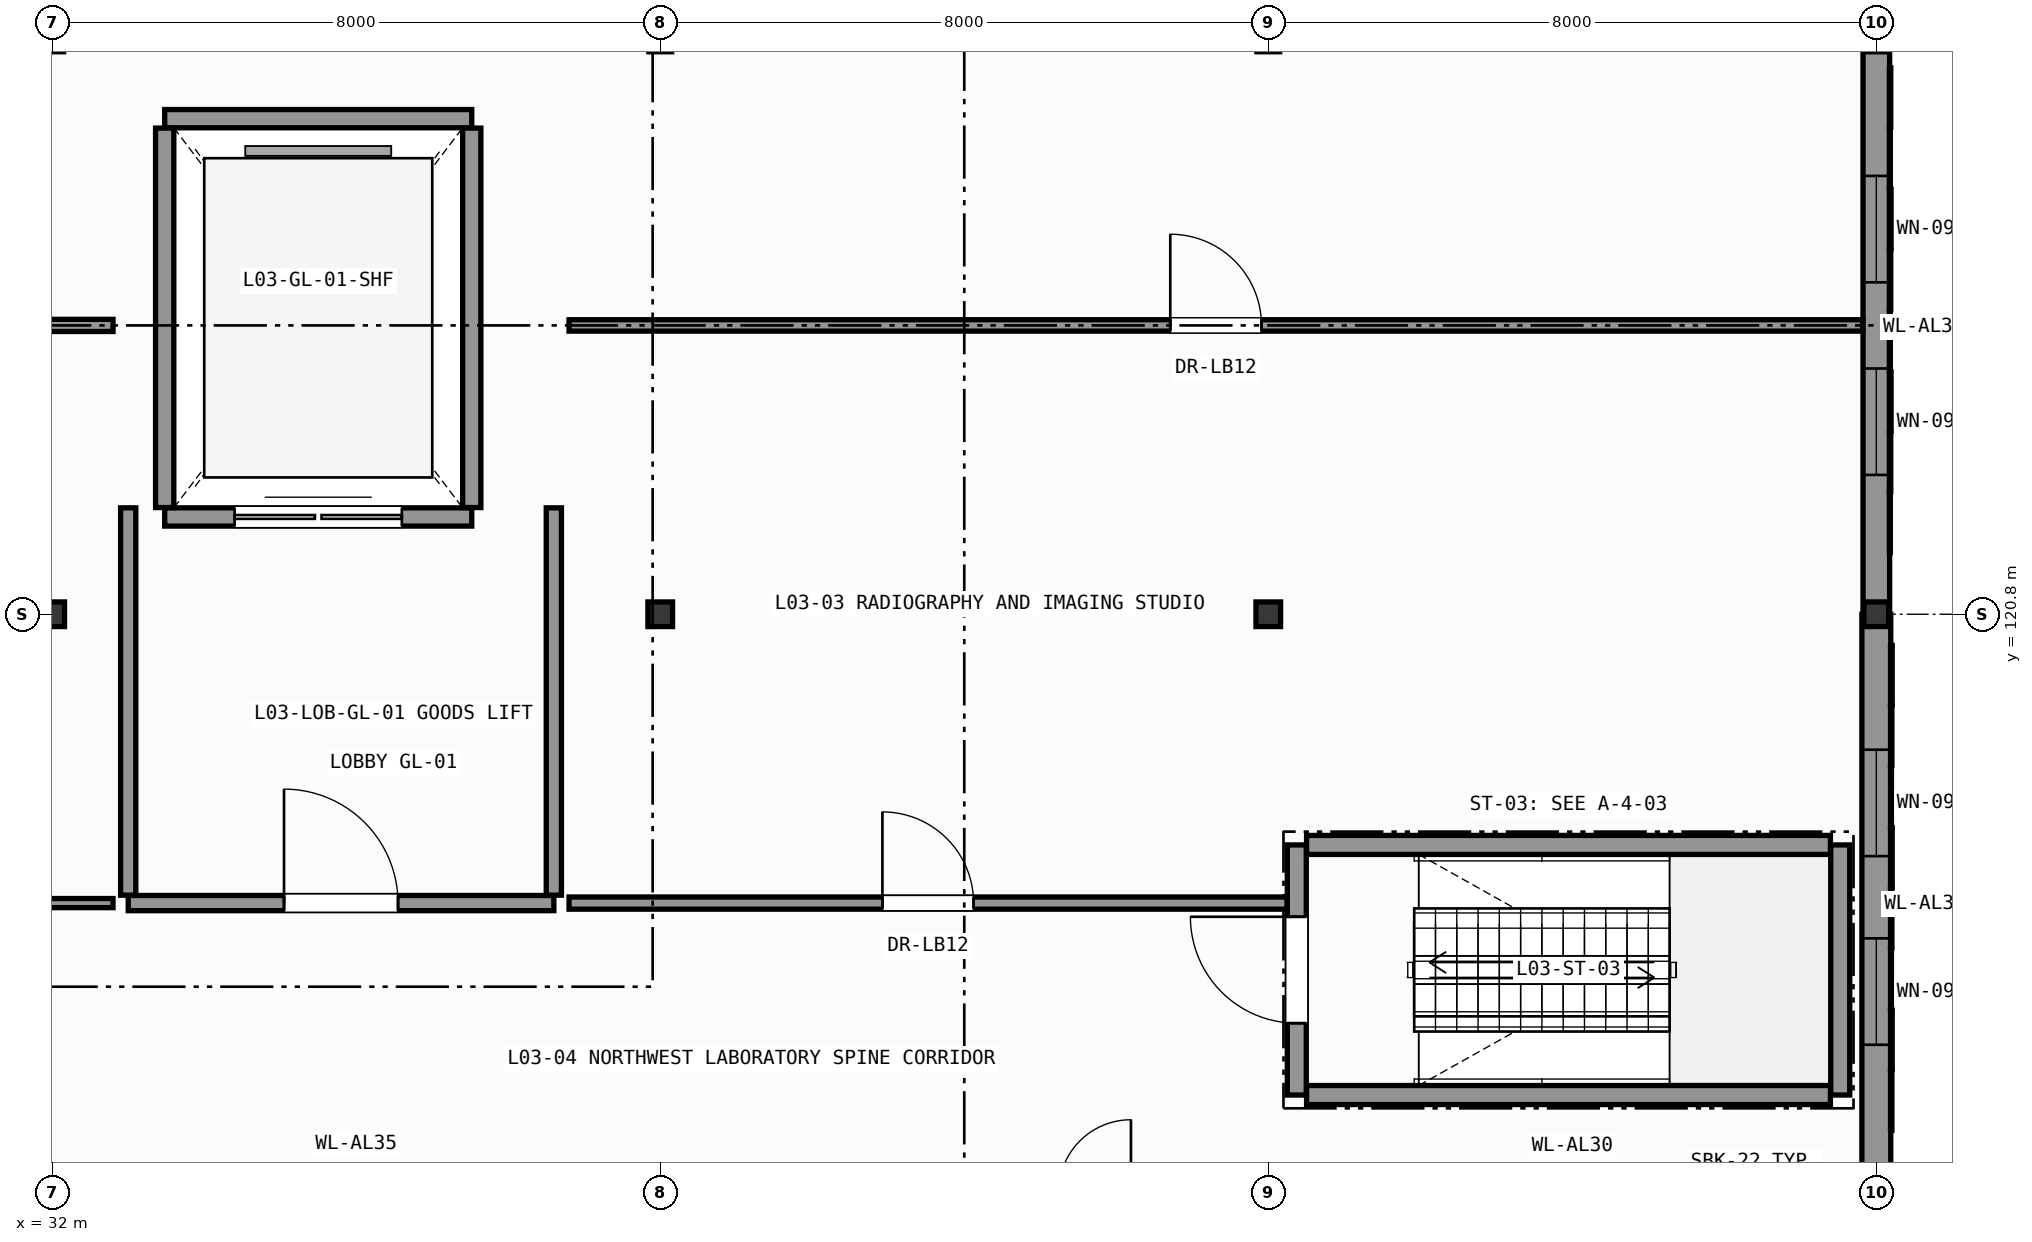
"""IFC4 building model, lengths in metres.
Left out: names, types, materials, properties, quantities, classifications, styles, units other than length and angle.
Written with IfcOpenShell. Run it as: python <this file> out.ifc"""

import sys

from ifc_helpers import new_model, si_unit, direction, frame, frame_2d, origin, origin_2d, place, context, subcontext, project, spatial, rectangle, hollow_circle, extrude, element, fill, save


model = new_model("IFC4")
c1 = context("Model", 3, precision=1e-05, world=origin(), true_north=direction((0.0, 1.0)))
c2 = subcontext(c1, "Body", "Model", "MODEL_VIEW")
j1 = project(units=[si_unit("LENGTHUNIT", "METRE"), si_unit("PLANEANGLEUNIT", "RADIAN")], contexts=[c1])
p1 = place(None, origin())
s1 = spatial("IfcSite", under=j1, at=p1, CompositionType="ELEMENT")
p2 = place(p1, origin())
s2 = spatial("IfcBuilding", under=s1, at=p2, CompositionType="ELEMENT")
p3 = place(p2, frame((0.0, 0.0, 13.2)))
s3 = spatial("IfcBuildingStorey", under=s2, at=p3, CompositionType="ELEMENT", Elevation=13.2)
for number, where, z_axis, x_axis in (
    (1, (32.0, 120.8, 0.0), (0.0, 0.0, 1.0), (1.0, 0.0, 0.0)),
    (2, (40.0, 120.8, 0.0), (0.0, 0.0, 1.0), (1.0, 0.0, 0.0)),
    (3, (48.0, 120.8, 0.0), (0.0, 0.0, 1.0), (1.0, 0.0, 0.0)),
    (4, (56.0, 120.8, 0.0), (0.0, 0.0, 1.0), (1.0, 0.0, 0.0)),
):
    element("IfcColumn", number, at=place(p3, frame(where, z_axis=z_axis, x_axis=x_axis)), inside=s3, PredefinedType="COLUMN", context=c2, shape_type="SweptSolid", body=[
        extrude(hollow_circle(Radius=0.162, WallThickness=0.016, at=origin_2d()), origin(), (0.0, 0.0, 1.0), 4.8),
    ])
p4 = place(p3, frame((56.0, 120.8, 0.0), z_axis=(0.0, 0.0, 1.0), x_axis=(0.0, -1.0, 0.0)))
e5 = element("IfcWall", 5, at=p4, inside=s3, PredefinedType="SOLIDWALL", context=c2, shape_type="SweptSolid", body=[
    extrude(rectangle(XDim=7.446, YDim=0.38, at=frame_2d((3.723, 0.0))), origin(), (0.0, 0.0, 1.0), 4.045),
])
p5 = place(p4, frame((1.782, 0.0, 0.95)))
e6 = element("IfcOpeningElement", 6, at=p5, cuts=e5, PredefinedType="OPENING", context=c2, shape_type="SweptSolid", body=[
    extrude(rectangle(XDim=1.4, YDim=2.0, at=frame_2d((0.7, 1.0))), frame((0.0, 0.2, 0.0), z_axis=(0.0, -1.0, 0.0), x_axis=(1.0, 0.0, 0.0)), (0.0, 0.0, 1.0), 0.4),
])
p6 = place(p4, frame((4.264, 0.0, 0.95)))
e7 = element("IfcOpeningElement", 7, at=p6, cuts=e5, PredefinedType="OPENING", context=c2, shape_type="SweptSolid", body=[
    extrude(rectangle(XDim=1.4, YDim=2.0, at=frame_2d((0.7, 1.0))), frame((0.0, 0.2, 0.0), z_axis=(0.0, -1.0, 0.0), x_axis=(1.0, 0.0, 0.0)), (0.0, 0.0, 1.0), 0.4),
])
p7 = place(p3, frame((56.0, 128.4, 0.0), z_axis=(0.0, 0.0, 1.0), x_axis=(0.0, -1.0, 0.0)))
e8 = element("IfcWall", 8, at=p7, inside=s3, PredefinedType="SOLIDWALL", context=c2, shape_type="SweptSolid", body=[
    extrude(rectangle(XDim=7.6, YDim=0.35, at=frame_2d((3.8, 0.0))), origin(), (0.0, 0.0, 1.0), 4.045),
])
p8 = place(p7, frame((1.833, 0.0, 0.95)))
e9 = element("IfcOpeningElement", 9, at=p8, cuts=e8, PredefinedType="OPENING", context=c2, shape_type="SweptSolid", body=[
    extrude(rectangle(XDim=1.4, YDim=2.0, at=frame_2d((0.7, 1.0))), frame((0.0, 0.185, 0.0), z_axis=(0.0, -1.0, 0.0), x_axis=(1.0, 0.0, 0.0)), (0.0, 0.0, 1.0), 0.37),
])
p9 = place(p7, frame((4.367, 0.0, 0.95)))
e10 = element("IfcOpeningElement", 10, at=p9, cuts=e8, PredefinedType="OPENING", context=c2, shape_type="SweptSolid", body=[
    extrude(rectangle(XDim=1.4, YDim=2.0, at=frame_2d((0.7, 1.0))), frame((0.0, 0.185, 0.0), z_axis=(0.0, -1.0, 0.0), x_axis=(1.0, 0.0, 0.0)), (0.0, 0.0, 1.0), 0.37),
])
p10 = place(p3, frame((48.375, 114.475, 0.0), z_axis=(0.0, 0.0, 1.0), x_axis=(0.0, 1.0, 0.0)))
e11 = element("IfcWall", 11, at=p10, inside=s3, PredefinedType="SHEAR", context=c2, shape_type="SweptSolid", body=[
    extrude(rectangle(XDim=3.29, YDim=0.25, at=frame_2d((1.645, 0.0))), origin(), (0.0, 0.0, 1.0), 4.56),
])
p11 = place(p10, frame((0.945, 0.0, 0.0)))
e12 = element("IfcOpeningElement", 12, at=p11, cuts=e11, PredefinedType="OPENING", context=c2, shape_type="SweptSolid", body=[
    extrude(rectangle(XDim=1.4, YDim=2.2, at=frame_2d((0.7, 1.1))), frame((0.0, 0.135, 0.0), z_axis=(0.0, -1.0, 0.0), x_axis=(1.0, 0.0, 0.0)), (0.0, 0.0, 1.0), 0.27),
])
p12 = place(p3, frame((55.525, 114.475, 0.0), z_axis=(0.0, 0.0, 1.0), x_axis=(0.0, 1.0, 0.0)))
e13 = element("IfcWall", 13, at=p12, inside=s3, PredefinedType="SHEAR", context=c2, shape_type="SweptSolid", body=[
    extrude(rectangle(XDim=3.29, YDim=0.25, at=frame_2d((1.645, 0.0))), origin(), (0.0, 0.0, 1.0), 4.56),
])
for number, where, z_axis, x_axis in (
    (14, (48.504, 114.475, 0.0), (0.0, 0.0, 1.0), (1.0, 0.0, 0.0)),
    (15, (48.504, 117.765, 0.0), (0.0, 0.0, 1.0), (1.0, 0.0, 0.0)),
):
    element("IfcWall", number, at=place(p3, frame(where, z_axis=z_axis, x_axis=x_axis)), inside=s3, PredefinedType="SHEAR", context=c2, shape_type="SweptSolid", body=[
        extrude(rectangle(XDim=6.892, YDim=0.25, at=frame_2d((3.446, 0.0))), origin(), (0.0, 0.0, 1.0), 4.56),
    ])
p13 = place(p3, frame((33.48, 122.08, 0.0), z_axis=(0.0, 0.0, 1.0), x_axis=(1.0, 0.0, 0.0)))
e16 = element("IfcWall", 16, at=p13, inside=s3, PredefinedType="SHEAR", context=c2, shape_type="SweptSolid", body=[
    extrude(rectangle(XDim=4.04, YDim=0.24, at=frame_2d((2.02, 0.0))), origin(), (0.0, 0.0, 1.0), 4.56),
])
p14 = place(p13, frame((0.92, 0.0, 0.0)))
e17 = element("IfcOpeningElement", 17, at=p14, cuts=e16, PredefinedType="OPENING", context=c2, shape_type="SweptSolid", body=[
    extrude(rectangle(XDim=2.2, YDim=2.6, at=frame_2d((1.1, 1.3))), frame((0.0, 0.13, 0.0), z_axis=(0.0, -1.0, 0.0), x_axis=(1.0, 0.0, 0.0)), (0.0, 0.0, 1.0), 0.26),
])
p15 = place(p3, frame((33.48, 127.32, 0.0), z_axis=(0.0, 0.0, 1.0), x_axis=(1.0, 0.0, 0.0)))
e18 = element("IfcWall", 18, at=p15, inside=s3, PredefinedType="SHEAR", context=c2, shape_type="SweptSolid", body=[
    extrude(rectangle(XDim=4.04, YDim=0.24, at=frame_2d((2.02, 0.0))), origin(), (0.0, 0.0, 1.0), 4.56),
])
for number, where, z_axis, x_axis in (
    (19, (33.48, 122.204, 0.0), (0.0, 0.0, 1.0), (0.0, 1.0, 0.0)),
    (20, (37.52, 122.204, 0.0), (0.0, 0.0, 1.0), (0.0, 1.0, 0.0)),
):
    element("IfcWall", number, at=place(p3, frame(where, z_axis=z_axis, x_axis=x_axis)), inside=s3, PredefinedType="SHEAR", context=c2, shape_type="SweptSolid", body=[
        extrude(rectangle(XDim=4.992, YDim=0.24, at=frame_2d((2.496, 0.0))), origin(), (0.0, 0.0, 1.0), 4.56),
    ])
p16 = place(p3, frame((33.0, 117.0, 0.0), z_axis=(0.0, 0.0, 1.0), x_axis=(1.0, 0.0, 0.0)))
e21 = element("IfcWall", 21, at=p16, inside=s3, PredefinedType="PARTITIONING", context=c2, shape_type="SweptSolid", body=[
    extrude(rectangle(XDim=5.6, YDim=0.2, at=frame_2d((2.8, 0.0))), origin(), (0.0, 0.0, 1.0), 4.56),
])
p17 = place(p16, frame((2.05, 0.0, 0.0)))
e22 = element("IfcOpeningElement", 22, at=p17, cuts=e21, PredefinedType="OPENING", context=c2, shape_type="SweptSolid", body=[
    extrude(rectangle(XDim=1.5, YDim=2.2, at=frame_2d((0.75, 1.1))), frame((0.0, 0.11, 0.0), z_axis=(0.0, -1.0, 0.0), x_axis=(1.0, 0.0, 0.0)), (0.0, 0.0, 1.0), 0.22),
])
for number, where, z_axis, x_axis in (
    (23, (33.0, 117.104, 0.0), (0.0, 0.0, 1.0), (0.0, 1.0, 0.0)),
    (24, (38.6, 117.104, 0.0), (0.0, 0.0, 1.0), (0.0, 1.0, 0.0)),
):
    element("IfcWall", number, at=place(p3, frame(where, z_axis=z_axis, x_axis=x_axis)), inside=s3, PredefinedType="PARTITIONING", context=c2, shape_type="SweptSolid", body=[
        extrude(rectangle(XDim=5.096, YDim=0.2, at=frame_2d((2.548, 0.0))), origin(), (0.0, 0.0, 1.0), 4.56),
    ])
p18 = place(p3, frame((24.164, 124.6, 0.0), z_axis=(0.0, 0.0, 1.0), x_axis=(1.0, 0.0, 0.0)))
e25 = element("IfcWall", 25, at=p18, inside=s3, PredefinedType="PARTITIONING", context=c2, shape_type="SweptSolid", body=[
    extrude(rectangle(XDim=8.636, YDim=0.16, at=frame_2d((4.318, 0.0))), origin(), (0.0, 0.0, 1.0), 4.56),
])
p19 = place(p18, frame((3.718, 0.0, 0.0)))
e26 = element("IfcOpeningElement", 26, at=p19, cuts=e25, PredefinedType="OPENING", context=c2, shape_type="SweptSolid", body=[
    extrude(rectangle(XDim=1.2, YDim=2.2, at=frame_2d((0.6, 1.1))), frame((0.0, 0.09, 0.0), z_axis=(0.0, -1.0, 0.0), x_axis=(1.0, 0.0, 0.0)), (0.0, 0.0, 1.0), 0.18),
])
p20 = place(p3, frame((38.8, 124.6, 0.0), z_axis=(0.0, 0.0, 1.0), x_axis=(1.0, 0.0, 0.0)))
e27 = element("IfcWall", 27, at=p20, inside=s3, PredefinedType="PARTITIONING", context=c2, shape_type="SweptSolid", body=[
    extrude(rectangle(XDim=17.021, YDim=0.15, at=frame_2d((8.51, 0.0))), origin(), (0.0, 0.0, 1.0), 4.56),
])
p21 = place(p20, frame((7.91, 0.0, 0.0)))
e28 = element("IfcOpeningElement", 28, at=p21, cuts=e27, PredefinedType="OPENING", context=c2, shape_type="SweptSolid", body=[
    extrude(rectangle(XDim=1.2, YDim=2.2, at=frame_2d((0.6, 1.1))), frame((0.0, 0.085, 0.0), z_axis=(0.0, -1.0, 0.0), x_axis=(1.0, 0.0, 0.0)), (0.0, 0.0, 1.0), 0.17),
])
p22 = place(p3, frame((24.154, 117.0, 0.0), z_axis=(0.0, 0.0, 1.0), x_axis=(1.0, 0.0, 0.0)))
e29 = element("IfcWall", 29, at=p22, inside=s3, PredefinedType="PARTITIONING", context=c2, shape_type="SweptSolid", body=[
    extrude(rectangle(XDim=8.646, YDim=0.12, at=frame_2d((4.323, 0.0))), origin(), (0.0, 0.0, 1.0), 4.56),
])
p23 = place(p22, frame((3.723, 0.0, 0.0)))
e30 = element("IfcOpeningElement", 30, at=p23, cuts=e29, PredefinedType="OPENING", context=c2, shape_type="SweptSolid", body=[
    extrude(rectangle(XDim=1.2, YDim=2.2, at=frame_2d((0.6, 1.1))), frame((0.0, 0.07, 0.0), z_axis=(0.0, -1.0, 0.0), x_axis=(1.0, 0.0, 0.0)), (0.0, 0.0, 1.0), 0.14),
])
p24 = place(p3, frame((38.8, 117.0, 0.0), z_axis=(0.0, 0.0, 1.0), x_axis=(1.0, 0.0, 0.0)))
e31 = element("IfcWall", 31, at=p24, inside=s3, PredefinedType="PARTITIONING", context=c2, shape_type="SweptSolid", body=[
    extrude(rectangle(XDim=9.446, YDim=0.16, at=frame_2d((4.723, 0.0))), origin(), (0.0, 0.0, 1.0), 4.56),
])
p25 = place(p24, frame((4.123, 0.0, 0.0)))
e32 = element("IfcOpeningElement", 32, at=p25, cuts=e31, PredefinedType="OPENING", context=c2, shape_type="SweptSolid", body=[
    extrude(rectangle(XDim=1.2, YDim=2.2, at=frame_2d((0.6, 1.1))), frame((0.0, 0.09, 0.0), z_axis=(0.0, -1.0, 0.0), x_axis=(1.0, 0.0, 0.0)), (0.0, 0.0, 1.0), 0.18),
])
p26 = place(p5, origin())
e33 = element("IfcWindow", 33, at=p26, inside=s3, PartitioningType="SINGLE_PANEL", PredefinedType="WINDOW", context=c2, shape_type="SweptSolid", body=[
    extrude(rectangle(XDim=1.4, YDim=2.0, at=frame_2d((0.7, 1.0))), frame((0.0, 0.03, 0.0), z_axis=(0.0, -1.0, 0.0), x_axis=(1.0, 0.0, 0.0)), (0.0, 0.0, 1.0), 0.06),
])
fill(e6, e33)
p27 = place(p6, origin())
e34 = element("IfcWindow", 34, at=p27, inside=s3, PartitioningType="SINGLE_PANEL", PredefinedType="WINDOW", context=c2, shape_type="SweptSolid", body=[
    extrude(rectangle(XDim=1.4, YDim=2.0, at=frame_2d((0.7, 1.0))), frame((0.0, 0.03, 0.0), z_axis=(0.0, -1.0, 0.0), x_axis=(1.0, 0.0, 0.0)), (0.0, 0.0, 1.0), 0.06),
])
fill(e7, e34)
p28 = place(p8, origin())
e35 = element("IfcWindow", 35, at=p28, inside=s3, PartitioningType="SINGLE_PANEL", PredefinedType="WINDOW", context=c2, shape_type="SweptSolid", body=[
    extrude(rectangle(XDim=1.4, YDim=2.0, at=frame_2d((0.7, 1.0))), frame((0.0, 0.03, 0.0), z_axis=(0.0, -1.0, 0.0), x_axis=(1.0, 0.0, 0.0)), (0.0, 0.0, 1.0), 0.06),
])
fill(e9, e35)
p29 = place(p9, origin())
e36 = element("IfcWindow", 36, at=p29, inside=s3, PartitioningType="SINGLE_PANEL", PredefinedType="WINDOW", context=c2, shape_type="SweptSolid", body=[
    extrude(rectangle(XDim=1.4, YDim=2.0, at=frame_2d((0.7, 1.0))), frame((0.0, 0.03, 0.0), z_axis=(0.0, -1.0, 0.0), x_axis=(1.0, 0.0, 0.0)), (0.0, 0.0, 1.0), 0.06),
])
fill(e10, e36)
p30 = place(p11, origin())
e37 = element("IfcDoor", 37, at=p30, inside=s3, OperationType="SINGLE_SWING_RIGHT", PredefinedType="DOOR", context=c2, shape_type="SweptSolid", body=[
    extrude(rectangle(XDim=1.4, YDim=2.2, at=frame_2d((0.7, 1.1))), frame((0.0, 0.025, 0.0), z_axis=(0.0, -1.0, 0.0), x_axis=(1.0, 0.0, 0.0)), (0.0, 0.0, 1.0), 0.05),
])
fill(e12, e37)
p31 = place(p14, origin())
e38 = element("IfcDoor", 38, at=p31, inside=s3, OperationType="DOUBLE_DOOR_SLIDING", PredefinedType="DOOR", context=c2, shape_type="SweptSolid", body=[
    extrude(rectangle(XDim=2.2, YDim=2.6, at=frame_2d((1.1, 1.3))), frame((0.0, 0.025, 0.0), z_axis=(0.0, -1.0, 0.0), x_axis=(1.0, 0.0, 0.0)), (0.0, 0.0, 1.0), 0.05),
])
fill(e17, e38)
p32 = place(p17, origin())
e39 = element("IfcDoor", 39, at=p32, inside=s3, OperationType="SINGLE_SWING_LEFT", PredefinedType="DOOR", context=c2, shape_type="SweptSolid", body=[
    extrude(rectangle(XDim=1.5, YDim=2.2, at=frame_2d((0.75, 1.1))), frame((0.0, 0.025, 0.0), z_axis=(0.0, -1.0, 0.0), x_axis=(1.0, 0.0, 0.0)), (0.0, 0.0, 1.0), 0.05),
])
fill(e22, e39)
p33 = place(p21, origin())
e40 = element("IfcDoor", 40, at=p33, inside=s3, OperationType="SINGLE_SWING_LEFT", PredefinedType="DOOR", context=c2, shape_type="SweptSolid", body=[
    extrude(rectangle(XDim=1.2, YDim=2.2, at=frame_2d((0.6, 1.1))), frame((0.0, 0.025, 0.0), z_axis=(0.0, -1.0, 0.0), x_axis=(1.0, 0.0, 0.0)), (0.0, 0.0, 1.0), 0.05),
])
fill(e28, e40)
p34 = place(p25, origin())
e41 = element("IfcDoor", 41, at=p34, inside=s3, OperationType="SINGLE_SWING_LEFT", PredefinedType="DOOR", context=c2, shape_type="SweptSolid", body=[
    extrude(rectangle(XDim=1.2, YDim=2.2, at=frame_2d((0.6, 1.1))), frame((0.0, 0.025, 0.0), z_axis=(0.0, -1.0, 0.0), x_axis=(1.0, 0.0, 0.0)), (0.0, 0.0, 1.0), 0.05),
])
fill(e32, e41)
save(model, sys.argv[1])
